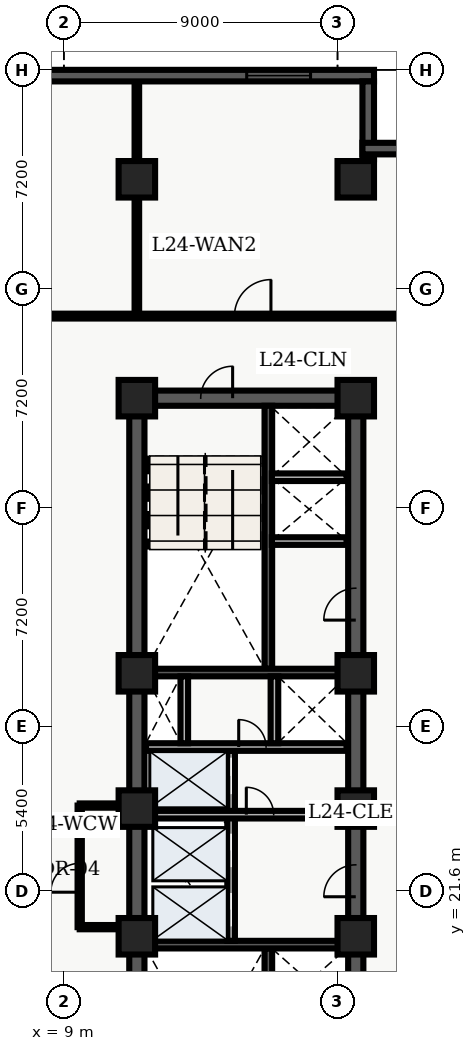
"""IFC4 building model, lengths in metres.
Left out: names, types, materials, properties, quantities, classifications, styles, units other than length and angle.
Written with IfcOpenShell. Run it as: python <this file> out.ifc"""

import sys

from ifc_helpers import new_model, entity, si_unit, converted_unit, direction, frame, origin_with_axes, origin_2d_with_axis, place, context, subcontext, project, spatial, polyline, rectangle, outline, extrude, element, fill, save


model = new_model("IFC4")
c1 = context("Model", 3, precision=1e-05, world=origin_with_axes(), true_north=direction((0.0, 1.0)))
c2 = subcontext(c1, "Body", "Model", "MODEL_VIEW")
j1 = project(units=[si_unit("LENGTHUNIT", "METRE"), converted_unit("PLANEANGLEUNIT", "DEGREE", entity("IfcPlaneAngleMeasure", 0.017), si_unit("PLANEANGLEUNIT", "RADIAN"), dimensions=[0, 0, 0, 0, 0, 0, 0])], contexts=[c1])
p1 = place(None, origin_with_axes())
s1 = spatial("IfcSite", under=j1, at=p1, CompositionType="ELEMENT")
p2 = place(p1, origin_with_axes())
s2 = spatial("IfcBuilding", under=s1, at=p2, CompositionType="ELEMENT")
p3 = place(p2, frame((0.0, 0.0, 100.8), z_axis=(0.0, 0.0, 1.0), x_axis=(1.0, 0.0, 0.0)))
s3 = spatial("IfcBuildingStorey", under=s2, at=p3, CompositionType="ELEMENT", Elevation=100.8)
p4 = place(p3, frame((11.4, 10.8, 0.0), z_axis=(0.0, 0.0, 1.0), x_axis=(0.0, 1.0, 0.0)))
e1 = element("IfcWall", 1, at=p4, inside=s3, PredefinedType="SHEAR", context=c2, shape_type="SweptSolid", body=[
    extrude(outline(polyline([(0.0, -0.25), (27.0, -0.25), (27.0, 0.25), (0.0, 0.25), (0.0, -0.25)])), origin_with_axes(), (0.0, 0.0, 1.0), 3.66),
])
p5 = place(p3, frame((11.4, 37.8, 0.0), z_axis=(0.0, 0.0, 1.0), x_axis=(1.0, 0.0, 0.0)))
e2 = element("IfcWall", 2, at=p5, inside=s3, PredefinedType="SHEAR", context=c2, shape_type="SweptSolid", body=[
    extrude(outline(polyline([(0.0, -0.25), (7.2, -0.25), (7.2, 0.25), (0.0, 0.25), (0.0, -0.25)])), origin_with_axes(), (0.0, 0.0, 1.0), 3.66),
])
p6 = place(p5, frame((2.625, 0.0, 0.0), z_axis=(0.0, 0.0, 1.0), x_axis=(1.0, 0.0, 0.0)))
e3 = element("IfcOpeningElement", 3, at=p6, cuts=e2, PredefinedType="OPENING", context=c2, shape_type="SweptSolid", body=[
    extrude(rectangle(XDim=1.05, YDim=0.52, at=origin_2d_with_axis()), origin_with_axes(), (0.0, 0.0, 1.0), 2.15),
])
p7 = place(p3, frame((18.6, 10.8, 0.0), z_axis=(0.0, 0.0, 1.0), x_axis=(0.0, 1.0, 0.0)))
e4 = element("IfcWall", 4, at=p7, inside=s3, PredefinedType="SHEAR", context=c2, shape_type="SweptSolid", body=[
    extrude(outline(polyline([(0.0, -0.25), (13.5, -0.25), (13.5, 0.25), (0.0, 0.25), (0.0, -0.25)])), origin_with_axes(), (0.0, 0.0, 1.0), 3.66),
])
p8 = place(p7, frame((11.125, 0.0, 0.0), z_axis=(0.0, 0.0, 1.0), x_axis=(1.0, 0.0, 0.0)))
e5 = element("IfcOpeningElement", 5, at=p8, cuts=e4, PredefinedType="OPENING", context=c2, shape_type="SweptSolid", body=[
    extrude(rectangle(XDim=1.05, YDim=0.52, at=origin_2d_with_axis()), origin_with_axes(), (0.0, 0.0, 1.0), 2.15),
])
p9 = place(p7, frame((2.325, 0.0, 0.0), z_axis=(0.0, 0.0, 1.0), x_axis=(1.0, 0.0, 0.0)))
e6 = element("IfcOpeningElement", 6, at=p9, cuts=e4, PredefinedType="OPENING", context=c2, shape_type="SweptSolid", body=[
    extrude(rectangle(XDim=0.95, YDim=0.52, at=origin_2d_with_axis()), origin_with_axes(), (0.0, 0.0, 1.0), 2.15),
])
p10 = place(p3, frame((18.6, 24.3, 0.0), z_axis=(0.0, 0.0, 1.0), x_axis=(0.0, 1.0, 0.0)))
e7 = element("IfcWall", 7, at=p10, inside=s3, PredefinedType="SHEAR", context=c2, shape_type="SweptSolid", body=[
    extrude(outline(polyline([(0.0, -0.25), (13.5, -0.25), (13.5, 0.25), (0.0, 0.25), (0.0, -0.25)])), origin_with_axes(), (0.0, 0.0, 1.0), 3.66),
])
p11 = place(p10, frame((6.725, 0.0, 0.0), z_axis=(0.0, 0.0, 1.0), x_axis=(1.0, 0.0, 0.0)))
e8 = element("IfcOpeningElement", 8, at=p11, cuts=e7, PredefinedType="OPENING", context=c2, shape_type="SweptSolid", body=[
    extrude(rectangle(XDim=1.05, YDim=0.52, at=origin_2d_with_axis()), origin_with_axes(), (0.0, 0.0, 1.0), 2.15),
])
p12 = place(p3, frame((15.725, 11.05, 0.0), z_axis=(0.0, 0.0, 1.0), x_axis=(0.0, 1.0, 0.0)))
e9 = element("IfcWall", 9, at=p12, inside=s3, PredefinedType="SHEAR", context=c2, shape_type="SweptSolid", body=[
    extrude(outline(polyline([(0.0, -0.125), (8.65, -0.125), (8.65, 0.125), (0.0, 0.125), (0.0, -0.125)])), origin_with_axes(), (0.0, 0.0, 1.0), 3.66),
])
p13 = place(p3, frame((11.65, 19.825, 0.0), z_axis=(0.0, 0.0, 1.0), x_axis=(1.0, 0.0, 0.0)))
e10 = element("IfcWall", 10, at=p13, inside=s3, PredefinedType="SHEAR", context=c2, shape_type="SweptSolid", body=[
    extrude(outline(polyline([(0.0, -0.125), (6.7, -0.125), (6.7, 0.125), (0.0, 0.125), (0.0, -0.125)])), origin_with_axes(), (0.0, 0.0, 1.0), 3.66),
])
p14 = place(p3, frame((15.725, 28.9, 0.0), z_axis=(0.0, 0.0, 1.0), x_axis=(0.0, 1.0, 0.0)))
e11 = element("IfcWall", 11, at=p14, inside=s3, PredefinedType="SHEAR", context=c2, shape_type="SweptSolid", body=[
    extrude(outline(polyline([(0.0, -0.125), (8.65, -0.125), (8.65, 0.125), (0.0, 0.125), (0.0, -0.125)])), origin_with_axes(), (0.0, 0.0, 1.0), 3.66),
])
p15 = place(p3, frame((11.65, 28.775, 0.0), z_axis=(0.0, 0.0, 1.0), x_axis=(1.0, 0.0, 0.0)))
e12 = element("IfcWall", 12, at=p15, inside=s3, PredefinedType="SHEAR", context=c2, shape_type="SweptSolid", body=[
    extrude(outline(polyline([(0.0, -0.125), (6.7, -0.125), (6.7, 0.125), (0.0, 0.125), (0.0, -0.125)])), origin_with_axes(), (0.0, 0.0, 1.0), 3.66),
])
p16 = place(p3, frame((14.5, 19.95, 0.0), z_axis=(0.0, 0.0, 1.0), x_axis=(0.0, 1.0, 0.0)))
e13 = element("IfcWall", 13, at=p16, inside=s3, PredefinedType="SOLIDWALL", context=c2, shape_type="SweptSolid", body=[
    extrude(outline(polyline([(0.0, -0.125), (6.25, -0.125), (6.25, 0.125), (0.0, 0.125), (0.0, -0.125)])), origin_with_axes(), (0.0, 0.0, 1.0), 2.7),
])
p17 = place(p16, frame((1.025, 0.0, 0.0), z_axis=(0.0, 0.0, 1.0), x_axis=(1.0, 0.0, 0.0)))
e14 = element("IfcOpeningElement", 14, at=p17, cuts=e13, PredefinedType="OPENING", context=c2, shape_type="SweptSolid", body=[
    extrude(rectangle(XDim=1.1, YDim=0.27, at=origin_2d_with_axis()), origin_with_axes(), (0.0, 0.0, 1.0), 2.15),
])
p18 = place(p16, frame((2.975, 0.0, 0.0), z_axis=(0.0, 0.0, 1.0), x_axis=(1.0, 0.0, 0.0)))
e15 = element("IfcOpeningElement", 15, at=p18, cuts=e13, PredefinedType="OPENING", context=c2, shape_type="SweptSolid", body=[
    extrude(rectangle(XDim=1.1, YDim=0.27, at=origin_2d_with_axis()), origin_with_axes(), (0.0, 0.0, 1.0), 2.15),
])
p19 = place(p16, frame((5.425, 0.0, 0.0), z_axis=(0.0, 0.0, 1.0), x_axis=(1.0, 0.0, 0.0)))
e16 = element("IfcOpeningElement", 16, at=p19, cuts=e13, PredefinedType="OPENING", context=c2, shape_type="SweptSolid", body=[
    extrude(rectangle(XDim=1.2, YDim=0.27, at=origin_2d_with_axis()), origin_with_axes(), (0.0, 0.0, 1.0), 2.15),
])
p20 = place(p3, frame((11.7, 24.1, 0.0), z_axis=(0.0, 0.0, 1.0), x_axis=(1.0, 0.0, 0.0)))
e17 = element("IfcWall", 17, at=p20, inside=s3, PredefinedType="SOLIDWALL", context=c2, shape_type="SweptSolid", body=[
    extrude(outline(polyline([(0.0, -0.125), (6.6, -0.125), (6.6, 0.125), (0.0, 0.125), (0.0, -0.125)])), origin_with_axes(), (0.0, 0.0, 1.0), 2.7),
])
p21 = place(p20, frame((3.75, 0.0, 0.0), z_axis=(0.0, 0.0, 1.0), x_axis=(1.0, 0.0, 0.0)))
e18 = element("IfcOpeningElement", 18, at=p21, cuts=e17, PredefinedType="OPENING", context=c2, shape_type="SweptSolid", body=[
    extrude(rectangle(XDim=0.9, YDim=0.27, at=origin_2d_with_axis()), origin_with_axes(), (0.0, 0.0, 1.0), 2.15),
])
p22 = place(p3, frame((11.7, 26.325, 0.0), z_axis=(0.0, 0.0, 1.0), x_axis=(1.0, 0.0, 0.0)))
e19 = element("IfcWall", 19, at=p22, inside=s3, PredefinedType="SOLIDWALL", context=c2, shape_type="SweptSolid", body=[
    extrude(outline(polyline([(0.0, -0.125), (6.6, -0.125), (6.6, 0.125), (0.0, 0.125), (0.0, -0.125)])), origin_with_axes(), (0.0, 0.0, 1.0), 2.7),
])
p23 = place(p22, frame((3.5, 0.0, 0.0), z_axis=(0.0, 0.0, 1.0), x_axis=(1.0, 0.0, 0.0)))
e20 = element("IfcOpeningElement", 20, at=p23, cuts=e19, PredefinedType="OPENING", context=c2, shape_type="SweptSolid", body=[
    extrude(rectangle(XDim=0.9, YDim=0.27, at=origin_2d_with_axis()), origin_with_axes(), (0.0, 0.0, 1.0), 2.15),
])
for number, where, z_axis, x_axis in (
    (21, (12.96, 26.45, 0.0), (0.0, 0.0, 1.0), (0.0, 1.0, 0.0)),
    (22, (15.925, 26.45, 0.0), (0.0, 0.0, 1.0), (0.0, 1.0, 0.0)),
):
    element("IfcWall", number, at=place(p3, frame(where, z_axis=z_axis, x_axis=x_axis)), inside=s3, PredefinedType="SOLIDWALL", context=c2, shape_type="SweptSolid", body=[
        extrude(outline(polyline([(0.0, -0.125), (2.2, -0.125), (2.2, 0.125), (0.0, 0.125), (0.0, -0.125)])), origin_with_axes(), (0.0, 0.0, 1.0), 2.7),
    ])
for number, where, z_axis, x_axis in (
    (23, (11.4, 20.1, 0.0), (0.0, 0.0, 1.0), (1.0, 0.0, 0.0)),
    (24, (11.4, 24.3, 0.0), (0.0, 0.0, 1.0), (1.0, 0.0, 0.0)),
    (25, (11.4, 28.75, 0.0), (0.0, 0.0, 1.0), (1.0, 0.0, 0.0)),
    (26, (11.4, 37.8, 0.0), (0.0, 0.0, 1.0), (1.0, 0.0, 0.0)),
    (27, (11.4, 45.0, 0.0), (0.0, 0.0, 1.0), (1.0, 0.0, 0.0)),
    (28, (18.6, 20.1, 0.0), (0.0, 0.0, 1.0), (1.0, 0.0, 0.0)),
    (29, (18.6, 24.3, 0.0), (0.0, 0.0, 1.0), (1.0, 0.0, 0.0)),
    (30, (18.6, 28.75, 0.0), (0.0, 0.0, 1.0), (1.0, 0.0, 0.0)),
    (31, (18.6, 37.8, 0.0), (0.0, 0.0, 1.0), (1.0, 0.0, 0.0)),
    (32, (18.6, 45.0, 0.0), (0.0, 0.0, 1.0), (1.0, 0.0, 0.0)),
):
    element("IfcColumn", number, at=place(p3, frame(where, z_axis=z_axis, x_axis=x_axis)), inside=s3, PredefinedType="COLUMN", context=c2, shape_type="SweptSolid", body=[
        extrude(rectangle(XDim=1.2, YDim=1.2, at=origin_2d_with_axis()), origin_with_axes(), (0.0, 0.0, 1.0), 3.9),
    ])
for number, where, z_axis, x_axis in (
    (33, (15.84, 33.1, 0.0), (0.0, 0.0, 1.0), (1.0, 0.0, 0.0)),
    (34, (15.84, 35.2, 0.0), (0.0, 0.0, 1.0), (1.0, 0.0, 0.0)),
):
    element("IfcWall", number, at=place(p3, frame(where, z_axis=z_axis, x_axis=x_axis)), inside=s3, PredefinedType="SOLIDWALL", context=c2, shape_type="SweptSolid", body=[
        extrude(outline(polyline([(0.0, -0.125), (2.46, -0.125), (2.46, 0.125), (0.0, 0.125), (0.0, -0.125)])), origin_with_axes(), (0.0, 0.0, 1.0), 2.7),
    ])
p24 = place(p3, frame((9.52, 20.4, 0.0), z_axis=(0.0, 0.0, 1.0), x_axis=(0.0, 1.0, 0.0)))
e35 = element("IfcWall", 35, at=p24, inside=s3, PredefinedType="PARTITIONING", context=c2, shape_type="SweptSolid", body=[
    extrude(outline(polyline([(0.0, -0.07), (4.0, -0.07), (4.0, 0.07), (0.0, 0.07), (0.0, -0.07)])), origin_with_axes(), (0.0, 0.0, 1.0), 2.7),
])
p25 = place(p24, frame((1.625, 0.0, 0.0), z_axis=(0.0, 0.0, 1.0), x_axis=(1.0, 0.0, 0.0)))
e36 = element("IfcOpeningElement", 36, at=p25, cuts=e35, PredefinedType="OPENING", context=c2, shape_type="SweptSolid", body=[
    extrude(rectangle(XDim=0.95, YDim=0.16, at=origin_2d_with_axis()), origin_with_axes(), (0.0, 0.0, 1.0), 2.15),
])
for number, where, z_axis, x_axis in (
    (37, (9.52, 20.4, 0.0), (0.0, 0.0, 1.0), (1.0, 0.0, 0.0)),
    (38, (9.52, 24.4, 0.0), (0.0, 0.0, 1.0), (1.0, 0.0, 0.0)),
):
    element("IfcWall", number, at=place(p3, frame(where, z_axis=z_axis, x_axis=x_axis)), inside=s3, PredefinedType="PARTITIONING", context=c2, shape_type="SweptSolid", body=[
        extrude(outline(polyline([(0.0, -0.07), (1.58, -0.07), (1.58, 0.07), (0.0, 0.07), (0.0, -0.07)])), origin_with_axes(), (0.0, 0.0, 1.0), 2.7),
    ])
p26 = place(p3, frame((2.6, 40.5, 0.0), z_axis=(0.0, 0.0, 1.0), x_axis=(1.0, 0.0, 0.0)))
e39 = element("IfcWall", 39, at=p26, inside=s3, PredefinedType="PARTITIONING", context=c2, shape_type="SweptSolid", body=[
    extrude(outline(polyline([(0.0, -0.08), (18.65, -0.08), (18.65, 0.08), (0.0, 0.08), (0.0, -0.08)])), origin_with_axes(), (0.0, 0.0, 1.0), 2.7),
])
p27 = place(p26, frame((5.275, 0.0, 0.0), z_axis=(0.0, 0.0, 1.0), x_axis=(1.0, 0.0, 0.0)))
e40 = element("IfcOpeningElement", 40, at=p27, cuts=e39, PredefinedType="OPENING", context=c2, shape_type="SweptSolid", body=[
    extrude(rectangle(XDim=1.0, YDim=0.18, at=origin_2d_with_axis()), origin_with_axes(), (0.0, 0.0, 1.0), 2.15),
])
p28 = place(p26, frame((12.61, 0.0, 0.0), z_axis=(0.0, 0.0, 1.0), x_axis=(1.0, 0.0, 0.0)))
e41 = element("IfcOpeningElement", 41, at=p28, cuts=e39, PredefinedType="OPENING", context=c2, shape_type="SweptSolid", body=[
    extrude(rectangle(XDim=1.2, YDim=0.18, at=origin_2d_with_axis()), origin_with_axes(), (0.0, 0.0, 1.0), 2.2),
])
p29 = place(p3, frame((11.4, 40.6, 0.0), z_axis=(0.0, 0.0, 1.0), x_axis=(0.0, 1.0, 0.0)))
e42 = element("IfcWall", 42, at=p29, inside=s3, PredefinedType="PARTITIONING", context=c2, shape_type="SweptSolid", body=[
    extrude(outline(polyline([(0.0, -0.075), (7.64, -0.075), (7.64, 0.075), (0.0, 0.075), (0.0, -0.075)])), origin_with_axes(), (0.0, 0.0, 1.0), 2.7),
])
p30 = place(p3, frame((2.78, 48.41, 0.0), z_axis=(0.0, 0.0, 1.0), x_axis=(1.0, 0.0, 0.0)))
e43 = element("IfcWall", 43, at=p30, inside=s3, PredefinedType="SOLIDWALL", context=c2, shape_type="SweptSolid", body=[
    extrude(outline(polyline([(0.0, -0.19), (16.42, -0.19), (16.42, 0.19), (0.0, 0.19), (0.0, -0.19)])), origin_with_axes(), (0.0, 0.0, 1.0), 3.66),
])
p31 = place(p30, frame((3.137, 0.0, 0.45), z_axis=(0.0, 0.0, 1.0), x_axis=(1.0, 0.0, 0.0)))
e44 = element("IfcOpeningElement", 44, at=p31, cuts=e43, PredefinedType="OPENING", context=c2, shape_type="SweptSolid", body=[
    extrude(rectangle(XDim=2.1, YDim=0.4, at=origin_2d_with_axis()), origin_with_axes(), (0.0, 0.0, 1.0), 2.2),
])
p32 = place(p30, frame((13.283, 0.0, 0.45), z_axis=(0.0, 0.0, 1.0), x_axis=(1.0, 0.0, 0.0)))
e45 = element("IfcOpeningElement", 45, at=p32, cuts=e43, PredefinedType="OPENING", context=c2, shape_type="SweptSolid", body=[
    extrude(rectangle(XDim=2.1, YDim=0.4, at=origin_2d_with_axis()), origin_with_axes(), (0.0, 0.0, 1.0), 2.2),
])
p33 = place(p3, frame((19.01, 48.22, 0.0), z_axis=(0.0, 0.0, 1.0), x_axis=(0.0, -1.0, 0.0)))
e46 = element("IfcWall", 46, at=p33, inside=s3, PredefinedType="SOLIDWALL", context=c2, shape_type="SweptSolid", body=[
    extrude(outline(polyline([(0.0, -0.19), (2.56, -0.19), (2.56, 0.19), (0.0, 0.19), (0.0, -0.19)])), origin_with_axes(), (0.0, 0.0, 1.0), 3.66),
])
p34 = place(p3, frame((18.82, 46.01, 0.0), z_axis=(0.0, 0.0, 1.0), x_axis=(1.0, 0.0, 0.0)))
e47 = element("IfcWall", 47, at=p34, inside=s3, PredefinedType="SOLIDWALL", context=c2, shape_type="SweptSolid", body=[
    extrude(outline(polyline([(0.0, -0.19), (2.78, -0.19), (2.78, 0.19), (0.0, 0.19), (0.0, -0.19)])), origin_with_axes(), (0.0, 0.0, 1.0), 3.66),
])
p35 = place(p16, frame((1.025, 0.0, 0.0), z_axis=(0.0, 0.0, 1.0), x_axis=(1.0, 0.0, 0.0)))
e48 = element("IfcDoor", 48, at=p35, inside=s3, OperationType="SLIDING_TO_LEFT", PredefinedType="DOOR", context=c2, shape_type="SweptSolid", body=[
    extrude(rectangle(XDim=1.1, YDim=0.09, at=origin_2d_with_axis()), origin_with_axes(), (0.0, 0.0, 1.0), 2.15),
])
fill(e14, e48)
p36 = place(p16, frame((2.975, 0.0, 0.0), z_axis=(0.0, 0.0, 1.0), x_axis=(1.0, 0.0, 0.0)))
e49 = element("IfcDoor", 49, at=p36, inside=s3, OperationType="SLIDING_TO_RIGHT", PredefinedType="DOOR", context=c2, shape_type="SweptSolid", body=[
    extrude(rectangle(XDim=1.1, YDim=0.09, at=origin_2d_with_axis()), origin_with_axes(), (0.0, 0.0, 1.0), 2.15),
])
fill(e15, e49)
p37 = place(p16, frame((5.425, 0.0, 0.0), z_axis=(0.0, 0.0, 1.0), x_axis=(1.0, 0.0, 0.0)))
e50 = element("IfcDoor", 50, at=p37, inside=s3, OperationType="DOUBLE_DOOR_SLIDING", PredefinedType="DOOR", context=c2, shape_type="SweptSolid", body=[
    extrude(rectangle(XDim=1.2, YDim=0.09, at=origin_2d_with_axis()), origin_with_axes(), (0.0, 0.0, 1.0), 2.15),
])
fill(e16, e50)
p38 = place(p5, frame((2.625, 0.0, 0.0), z_axis=(0.0, 0.0, 1.0), x_axis=(1.0, 0.0, 0.0)))
e51 = element("IfcDoor", 51, at=p38, inside=s3, OperationType="SINGLE_SWING_RIGHT", PredefinedType="DOOR", context=c2, shape_type="SweptSolid", body=[
    extrude(rectangle(XDim=1.05, YDim=0.09, at=origin_2d_with_axis()), origin_with_axes(), (0.0, 0.0, 1.0), 2.15),
])
fill(e3, e51)
p39 = place(p7, frame((11.125, 0.0, 0.0), z_axis=(0.0, 0.0, 1.0), x_axis=(1.0, 0.0, 0.0)))
e52 = element("IfcDoor", 52, at=p39, inside=s3, OperationType="SINGLE_SWING_LEFT", PredefinedType="DOOR", context=c2, shape_type="SweptSolid", body=[
    extrude(rectangle(XDim=1.05, YDim=0.09, at=origin_2d_with_axis()), origin_with_axes(), (0.0, 0.0, 1.0), 2.15),
])
fill(e5, e52)
p40 = place(p20, frame((3.75, 0.0, 0.0), z_axis=(0.0, 0.0, 1.0), x_axis=(1.0, 0.0, 0.0)))
e53 = element("IfcDoor", 53, at=p40, inside=s3, OperationType="SINGLE_SWING_LEFT", PredefinedType="DOOR", context=c2, shape_type="SweptSolid", body=[
    extrude(rectangle(XDim=0.9, YDim=0.09, at=origin_2d_with_axis()), origin_with_axes(), (0.0, 0.0, 1.0), 2.15),
])
fill(e18, e53)
p41 = place(p22, frame((3.5, 0.0, 0.0), z_axis=(0.0, 0.0, 1.0), x_axis=(1.0, 0.0, 0.0)))
e54 = element("IfcDoor", 54, at=p41, inside=s3, OperationType="SINGLE_SWING_LEFT", PredefinedType="DOOR", context=c2, shape_type="SweptSolid", body=[
    extrude(rectangle(XDim=0.9, YDim=0.09, at=origin_2d_with_axis()), origin_with_axes(), (0.0, 0.0, 1.0), 2.15),
])
fill(e20, e54)
p42 = place(p10, frame((6.725, 0.0, 0.0), z_axis=(0.0, 0.0, 1.0), x_axis=(1.0, 0.0, 0.0)))
e55 = element("IfcDoor", 55, at=p42, inside=s3, OperationType="SINGLE_SWING_LEFT", PredefinedType="DOOR", context=c2, shape_type="SweptSolid", body=[
    extrude(rectangle(XDim=1.05, YDim=0.09, at=origin_2d_with_axis()), origin_with_axes(), (0.0, 0.0, 1.0), 2.15),
])
fill(e8, e55)
p43 = place(p24, frame((1.625, 0.0, 0.0), z_axis=(0.0, 0.0, 1.0), x_axis=(1.0, 0.0, 0.0)))
e56 = element("IfcDoor", 56, at=p43, inside=s3, OperationType="SINGLE_SWING_LEFT", PredefinedType="DOOR", context=c2, shape_type="SweptSolid", body=[
    extrude(rectangle(XDim=0.95, YDim=0.084, at=origin_2d_with_axis()), origin_with_axes(), (0.0, 0.0, 1.0), 2.15),
])
fill(e36, e56)
p44 = place(p26, frame((12.61, 0.0, 0.0), z_axis=(0.0, 0.0, 1.0), x_axis=(1.0, 0.0, 0.0)))
e57 = element("IfcDoor", 57, at=p44, inside=s3, OperationType="SINGLE_SWING_RIGHT", PredefinedType="DOOR", context=c2, shape_type="SweptSolid", body=[
    extrude(rectangle(XDim=1.2, YDim=0.09, at=origin_2d_with_axis()), origin_with_axes(), (0.0, 0.0, 1.0), 2.2),
])
fill(e41, e57)
p45 = place(p30, frame((13.283, 0.0, 0.45), z_axis=(0.0, 0.0, 1.0), x_axis=(1.0, 0.0, 0.0)))
e58 = element("IfcWindow", 58, at=p45, inside=s3, PredefinedType="WINDOW", context=c2, shape_type="SweptSolid", body=[
    extrude(rectangle(XDim=2.1, YDim=0.09, at=origin_2d_with_axis()), origin_with_axes(), (0.0, 0.0, 1.0), 2.2),
])
fill(e45, e58)
save(model, sys.argv[1])
